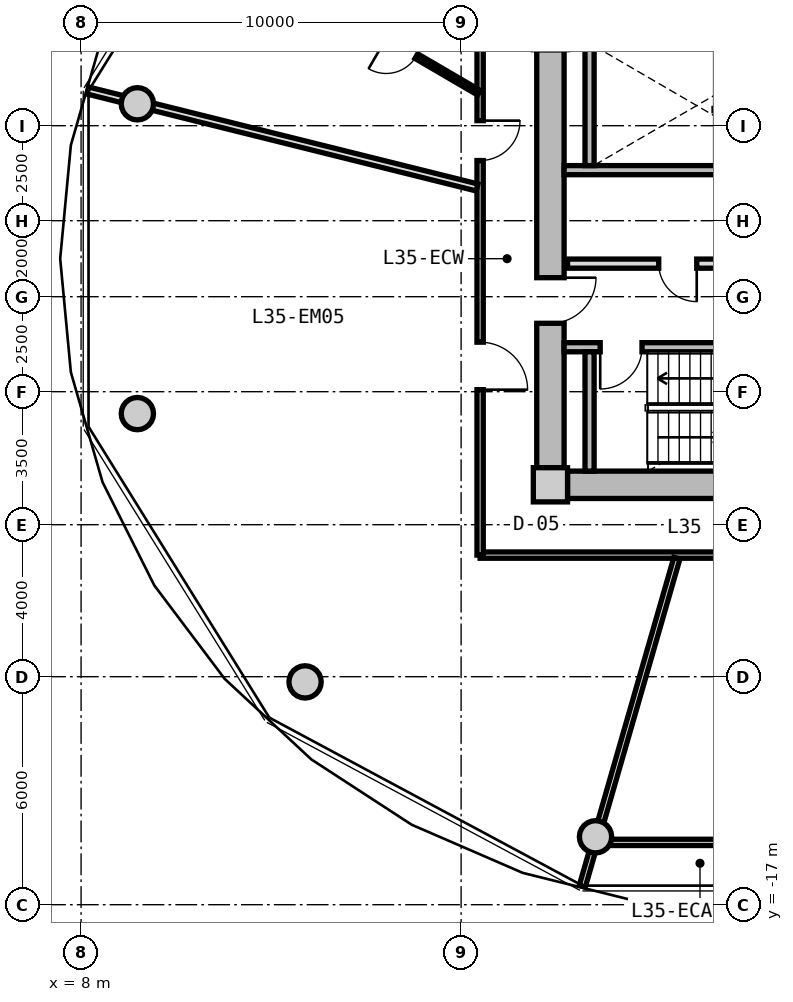
"""IFC4 building model, lengths in metres.
Left out: names, types, materials, properties, quantities, classifications, styles, units other than length and angle.
Written with IfcOpenShell. Run it as: python <this file> out.ifc"""

import sys

from ifc_helpers import new_model, si_unit, direction, frame, frame_2d, origin, origin_2d, place, context, subcontext, project, spatial, rectangle, circle, extrude, source, transform, mapped, element, fill, save


model = new_model("IFC4")
c1 = context("Model", 3, precision=1e-05, world=origin(), true_north=direction((0.0, 1.0)))
c2 = subcontext(c1, "Body", "Model", "MODEL_VIEW")
j1 = project(units=[si_unit("LENGTHUNIT", "METRE"), si_unit("PLANEANGLEUNIT", "RADIAN")], contexts=[c1])
p1 = place(None, origin())
s1 = spatial("IfcSite", under=j1, at=p1, CompositionType="ELEMENT")
p2 = place(p1, origin())
s2 = spatial("IfcBuilding", under=s1, at=p2, CompositionType="ELEMENT")
p3 = place(p2, frame((0.0, 0.0, 114.55)))
s3 = spatial("IfcBuildingStorey", under=s2, at=p3, CompositionType="ELEMENT", Elevation=114.55)
m1 = source(origin(), c2, "Body", "SweptSolid", [
    extrude(rectangle(XDim=0.9, YDim=0.9, at=origin_2d()), origin(), (0.0, 0.0, 1.0), 3.05),
])
p4 = place(p3, frame((20.35, -5.95, 0.0), z_axis=(0.0, 0.0, 1.0), x_axis=(1.0, 0.0, 0.0)))
e1 = element("IfcColumn", 1, at=p4, inside=s3, PredefinedType="COLUMN", context=c2, shape_type="MappedRepresentation", body=[
    mapped(m1, transform((0.0, 0.0, 0.0), x_axis=(1.0, 0.0, 0.0), y_axis=(0.0, 1.0, 0.0), z_axis=(0.0, 0.0, 1.0), scale=1.0)),
])
m2 = source(origin(), c2, "Body", "SweptSolid", [
    extrude(rectangle(XDim=14.4, YDim=0.72, at=frame_2d((7.2, 0.0))), origin(), (0.0, 0.0, 1.0), 2.79),
])
p5 = place(p3, frame((35.2, -5.95, 0.0), z_axis=(0.0, 0.0, 1.0), x_axis=(-1.0, 0.0, 0.0)))
e2 = element("IfcWall", 2, at=p5, inside=s3, PredefinedType="SHEAR", context=c2, shape_type="MappedRepresentation", body=[
    mapped(m2, transform((0.0, 0.0, 0.0), x_axis=(1.0, 0.0, 0.0), y_axis=(0.0, 1.0, 0.0), z_axis=(0.0, 0.0, 1.0), scale=1.0)),
])
m3 = source(origin(), c2, "Body", "SweptSolid", [
    extrude(rectangle(XDim=11.0, YDim=0.72, at=frame_2d((5.5, 0.0))), origin(), (0.0, 0.0, 1.0), 2.79),
])
p6 = place(p3, frame((20.35, -5.5, 0.0), z_axis=(0.0, 0.0, 1.0), x_axis=(0.0, 1.0, 0.0)))
e3 = element("IfcWall", 3, at=p6, inside=s3, PredefinedType="SHEAR", context=c2, shape_type="MappedRepresentation", body=[
    mapped(m3, transform((0.0, 0.0, 0.0), x_axis=(1.0, 0.0, 0.0), y_axis=(0.0, 1.0, 0.0), z_axis=(0.0, 0.0, 1.0), scale=1.0)),
])
p7 = place(p6, frame((3.8, 0.0, 0.0)))
e4 = element("IfcOpeningElement", 4, at=p7, cuts=e3, PredefinedType="OPENING", context=c2, shape_type="SweptSolid", body=[
    extrude(rectangle(XDim=1.2, YDim=2.15, at=frame_2d((0.6, 1.075))), frame((0.0, 0.37, 0.0), z_axis=(0.0, -1.0, 0.0), x_axis=(1.0, 0.0, 0.0)), (0.0, 0.0, 1.0), 0.74),
])
m4 = source(origin(), c2, "Body", "SweptSolid", [
    extrude(circle(Radius=0.425, at=origin_2d()), origin(), (0.0, 0.0, 1.0), 3.05),
])
for number, where, z_axis, x_axis in (
    (5, (9.481, 4.076, 0.0), (0.0, 0.0, 1.0), (1.0, 0.0, 0.0)),
    (6, (9.481, -4.076, 0.0), (0.0, 0.0, 1.0), (1.0, 0.0, 0.0)),
    (7, (13.894, -11.137, 0.0), (0.0, 0.0, 1.0), (1.0, 0.0, 0.0)),
    (8, (21.537, -15.213, 0.0), (0.0, 0.0, 1.0), (1.0, 0.0, 0.0)),
):
    element("IfcColumn", number, at=place(p3, frame(where, z_axis=z_axis, x_axis=x_axis)), inside=s3, PredefinedType="COLUMN", context=c2, shape_type="MappedRepresentation", body=[
        mapped(m4, transform((0.0, 0.0, 0.0), x_axis=(1.0, 0.0, 0.0), y_axis=(0.0, 1.0, 0.0), z_axis=(0.0, 0.0, 1.0), scale=1.0)),
    ])
m5 = source(origin(), c2, "Body", "SweptSolid", [
    extrude(rectangle(XDim=7.83, YDim=0.24, at=frame_2d((3.915, 0.0))), origin(), (0.0, 0.0, 1.0), 2.79),
])
p8 = place(p3, frame((20.71, 2.33, 0.0), z_axis=(0.0, 0.0, 1.0), x_axis=(1.0, 0.0, 0.0)))
e9 = element("IfcWall", 9, at=p8, inside=s3, PredefinedType="PARTITIONING", context=c2, shape_type="MappedRepresentation", body=[
    mapped(m5, transform((0.0, 0.0, 0.0), x_axis=(1.0, 0.0, 0.0), y_axis=(0.0, 1.0, 0.0), z_axis=(0.0, 0.0, 1.0), scale=1.0)),
])
m6 = source(origin(), c2, "Body", "SweptSolid", [
    extrude(rectangle(XDim=3.14, YDim=0.24, at=frame_2d((1.57, 0.0))), origin(), (0.0, 0.0, 1.0), 2.79),
])
p9 = place(p3, frame((21.38, 2.45, 0.0), z_axis=(0.0, 0.0, 1.0), x_axis=(0.0, 1.0, 0.0)))
e10 = element("IfcWall", 10, at=p9, inside=s3, PredefinedType="PARTITIONING", context=c2, shape_type="MappedRepresentation", body=[
    mapped(m6, transform((0.0, 0.0, 0.0), x_axis=(1.0, 0.0, 0.0), y_axis=(0.0, 1.0, 0.0), z_axis=(0.0, 0.0, 1.0), scale=1.0)),
])
p10 = place(p3, frame((20.71, -2.33, 0.0), z_axis=(0.0, 0.0, 1.0), x_axis=(1.0, 0.0, 0.0)))
e11 = element("IfcWall", 11, at=p10, inside=s3, PredefinedType="PARTITIONING", context=c2, shape_type="MappedRepresentation", body=[
    mapped(m5, transform((0.0, 0.0, 0.0), x_axis=(1.0, 0.0, 0.0), y_axis=(0.0, 1.0, 0.0), z_axis=(0.0, 0.0, 1.0), scale=1.0)),
])
p11 = place(p10, frame((0.95, 0.0, 0.0)))
e12 = element("IfcOpeningElement", 12, at=p11, cuts=e11, PredefinedType="OPENING", context=c2, shape_type="SweptSolid", body=[
    extrude(rectangle(XDim=1.1, YDim=2.15, at=frame_2d((0.55, 1.075))), frame((0.0, 0.13, 0.0), z_axis=(0.0, -1.0, 0.0), x_axis=(1.0, 0.0, 0.0)), (0.0, 0.0, 1.0), 0.26),
])
p12 = place(p3, frame((21.38, -5.59, 0.0), z_axis=(0.0, 0.0, 1.0), x_axis=(0.0, 1.0, 0.0)))
e13 = element("IfcWall", 13, at=p12, inside=s3, PredefinedType="PARTITIONING", context=c2, shape_type="MappedRepresentation", body=[
    mapped(m6, transform((0.0, 0.0, 0.0), x_axis=(1.0, 0.0, 0.0), y_axis=(0.0, 1.0, 0.0), z_axis=(0.0, 0.0, 1.0), scale=1.0)),
])
m7 = source(origin(), c2, "Body", "SweptSolid", [
    extrude(rectangle(XDim=7.62, YDim=0.24, at=frame_2d((3.81, 0.0))), origin(), (0.0, 0.0, 1.0), 2.775),
])
p13 = place(p3, frame((20.8, -0.13, 0.0), z_axis=(0.0, 0.0, 1.0), x_axis=(1.0, 0.0, 0.0)))
e14 = element("IfcWall", 14, at=p13, inside=s3, PredefinedType="PARTITIONING", context=c2, shape_type="MappedRepresentation", body=[
    mapped(m7, transform((0.0, 0.0, 0.0), x_axis=(1.0, 0.0, 0.0), y_axis=(0.0, 1.0, 0.0), z_axis=(0.0, 0.0, 1.0), scale=1.0)),
])
p14 = place(p13, frame((6.22, 0.0, 0.0)))
e15 = element("IfcOpeningElement", 15, at=p14, cuts=e14, PredefinedType="OPENING", context=c2, shape_type="SweptSolid", body=[
    extrude(rectangle(XDim=1.0, YDim=2.1, at=frame_2d((0.5, 1.05))), frame((0.0, 0.13, 0.0), z_axis=(0.0, -1.0, 0.0), x_axis=(1.0, 0.0, 0.0)), (0.0, 0.0, 1.0), 0.26),
])
p15 = place(p13, frame((2.4, 0.0, 0.0)))
e16 = element("IfcOpeningElement", 16, at=p15, cuts=e14, PredefinedType="OPENING", context=c2, shape_type="SweptSolid", body=[
    extrude(rectangle(XDim=1.0, YDim=2.1, at=frame_2d((0.5, 1.05))), frame((0.0, 0.13, 0.0), z_axis=(0.0, -1.0, 0.0), x_axis=(1.0, 0.0, 0.0)), (0.0, 0.0, 1.0), 0.26),
])
m8 = source(origin(), c2, "Body", "SweptSolid", [
    extrude(rectangle(XDim=8.6, YDim=0.165, at=frame_2d((4.3, 0.0))), origin(), (0.0, 0.0, 1.0), 2.775),
])
p16 = place(p3, frame((27.1, -7.8, 0.0), z_axis=(0.0, 0.0, 1.0), x_axis=(-1.0, 0.0, 0.0)))
e17 = element("IfcWall", 17, at=p16, inside=s3, PredefinedType="PARTITIONING", context=c2, shape_type="MappedRepresentation", body=[
    mapped(m8, transform((0.0, 0.0, 0.0), x_axis=(1.0, 0.0, 0.0), y_axis=(0.0, 1.0, 0.0), z_axis=(0.0, 0.0, 1.0), scale=1.0)),
])
m9 = source(origin(), c2, "Body", "SweptSolid", [
    extrude(rectangle(XDim=15.6, YDim=0.165, at=frame_2d((7.8, 0.0))), origin(), (0.0, 0.0, 1.0), 2.775),
])
p17 = place(p3, frame((18.5, -7.8, 0.0), z_axis=(0.0, 0.0, 1.0), x_axis=(0.0, 1.0, 0.0)))
e18 = element("IfcWall", 18, at=p17, inside=s3, PredefinedType="PARTITIONING", context=c2, shape_type="MappedRepresentation", body=[
    mapped(m9, transform((0.0, 0.0, 0.0), x_axis=(1.0, 0.0, 0.0), y_axis=(0.0, 1.0, 0.0), z_axis=(0.0, 0.0, 1.0), scale=1.0)),
])
p18 = place(p17, frame((10.383, 0.0, 0.0)))
e19 = element("IfcOpeningElement", 19, at=p18, cuts=e18, PredefinedType="OPENING", context=c2, shape_type="SweptSolid", body=[
    extrude(rectangle(XDim=1.05, YDim=2.15, at=frame_2d((0.525, 1.075))), frame((0.0, 0.093, 0.0), z_axis=(0.0, -1.0, 0.0), x_axis=(1.0, 0.0, 0.0)), (0.0, 0.0, 1.0), 0.185),
])
p19 = place(p17, frame((4.353, 0.0, 0.0)))
e20 = element("IfcOpeningElement", 20, at=p19, cuts=e18, PredefinedType="OPENING", context=c2, shape_type="SweptSolid", body=[
    extrude(rectangle(XDim=1.25, YDim=2.2, at=frame_2d((0.625, 1.1))), frame((0.0, 0.093, 0.0), z_axis=(0.0, -1.0, 0.0), x_axis=(1.0, 0.0, 0.0)), (0.0, 0.0, 1.0), 0.185),
])
m10 = source(origin(), c2, "Body", "SweptSolid", [
    extrude(rectangle(XDim=8.989, YDim=0.165, at=frame_2d((4.495, 0.0))), origin(), (0.0, 0.0, 1.0), 2.275),
])
p20 = place(p3, frame((23.678, -7.88, 0.0), z_axis=(0.0, 0.0, 1.0), x_axis=(-0.27702323008, -0.960863221274, 0.0)))
e21 = element("IfcWall", 21, at=p20, inside=s3, PredefinedType="PARTITIONING", context=c2, shape_type="MappedRepresentation", body=[
    mapped(m10, transform((0.0, 0.0, 0.0), x_axis=(1.0, 0.0, 0.0), y_axis=(0.0, 1.0, 0.0), z_axis=(0.0, 0.0, 1.0), scale=1.0)),
])
m11 = source(origin(), c2, "Body", "SweptSolid", [
    extrude(rectangle(XDim=5.814, YDim=0.165, at=frame_2d((2.907, 0.0))), origin(), (0.0, 0.0, 1.0), 2.275),
])
p21 = place(p3, frame((21.366, -15.36, 0.0), z_axis=(0.0, 0.0, 1.0), x_axis=(1.0, 0.0, 0.0)))
e22 = element("IfcWall", 22, at=p21, inside=s3, PredefinedType="PARTITIONING", context=c2, shape_type="MappedRepresentation", body=[
    mapped(m11, transform((0.0, 0.0, 0.0), x_axis=(1.0, 0.0, 0.0), y_axis=(0.0, 1.0, 0.0), z_axis=(0.0, 0.0, 1.0), scale=1.0)),
])
m12 = source(origin(), c2, "Body", "SweptSolid", [
    extrude(rectangle(XDim=10.556, YDim=0.19, at=frame_2d((5.278, 0.0))), origin(), (0.0, 0.0, 1.0), 2.275),
])
p22 = place(p3, frame((18.42, 1.875, 0.0), z_axis=(0.0, 0.0, 1.0), x_axis=(-0.970363857851, 0.241648470667, 0.0)))
e23 = element("IfcWall", 23, at=p22, inside=s3, PredefinedType="PARTITIONING", context=c2, shape_type="MappedRepresentation", body=[
    mapped(m12, transform((0.0, 0.0, 0.0), x_axis=(1.0, 0.0, 0.0), y_axis=(0.0, 1.0, 0.0), z_axis=(0.0, 0.0, 1.0), scale=1.0)),
])
m13 = source(origin(), c2, "Body", "SweptSolid", [
    extrude(rectangle(XDim=4.735, YDim=0.14, at=frame_2d((2.368, 0.0))), origin(), (0.0, 0.0, 1.0), 2.775),
])
p23 = place(p3, frame((18.47, 4.368, 0.0), z_axis=(0.0, 0.0, 1.0), x_axis=(-0.863537576642, 0.504284496814, 0.0)))
e24 = element("IfcWall", 24, at=p23, inside=s3, PredefinedType="PARTITIONING", context=c2, shape_type="MappedRepresentation", body=[
    mapped(m13, transform((0.0, 0.0, 0.0), x_axis=(1.0, 0.0, 0.0), y_axis=(0.0, 1.0, 0.0), z_axis=(0.0, 0.0, 1.0), scale=1.0)),
])
p24 = place(p23, frame((1.908, 0.0, 0.0)))
e25 = element("IfcOpeningElement", 25, at=p24, cuts=e24, PredefinedType="OPENING", context=c2, shape_type="SweptSolid", body=[
    extrude(rectangle(XDim=0.92, YDim=2.1, at=frame_2d((0.46, 1.05))), frame((0.0, 0.08, 0.0), z_axis=(0.0, -1.0, 0.0), x_axis=(1.0, 0.0, 0.0)), (0.0, 0.0, 1.0), 0.16),
])
m14 = source(origin(), c2, "Body", "SweptSolid", [
    extrude(rectangle(XDim=1.1, YDim=2.15, at=frame_2d((0.55, 1.075))), frame((0.0, 0.025, 0.0), z_axis=(0.0, -1.0, 0.0), x_axis=(1.0, 0.0, 0.0)), (0.0, 0.0, 1.0), 0.05),
])
p25 = place(p11, frame((1.1, 0.0, 0.0), z_axis=(0.0, 0.0, 1.0), x_axis=(-1.0, 0.0, 0.0)))
e26 = element("IfcDoor", 26, at=p25, inside=s3, OperationType="SINGLE_SWING_RIGHT", PredefinedType="DOOR", context=c2, shape_type="MappedRepresentation", body=[
    mapped(m14, transform((0.0, 0.0, 0.0), x_axis=(1.0, 0.0, 0.0), y_axis=(0.0, 1.0, 0.0), z_axis=(0.0, 0.0, 1.0), scale=1.0)),
])
fill(e12, e26)
m15 = source(origin(), c2, "Body", "SweptSolid", [
    extrude(rectangle(XDim=1.2, YDim=2.15, at=frame_2d((0.6, 1.075))), frame((0.0, 0.025, 0.0), z_axis=(0.0, -1.0, 0.0), x_axis=(1.0, 0.0, 0.0)), (0.0, 0.0, 1.0), 0.05),
])
p26 = place(p7, frame((1.2, 0.0, 0.0), z_axis=(0.0, 0.0, 1.0), x_axis=(-1.0, 0.0, 0.0)))
e27 = element("IfcDoor", 27, at=p26, inside=s3, OperationType="SINGLE_SWING_LEFT", PredefinedType="DOOR", context=c2, shape_type="MappedRepresentation", body=[
    mapped(m15, transform((0.0, 0.0, 0.0), x_axis=(1.0, 0.0, 0.0), y_axis=(0.0, 1.0, 0.0), z_axis=(0.0, 0.0, 1.0), scale=1.0)),
])
fill(e4, e27)
m16 = source(origin(), c2, "Body", "SweptSolid", [
    extrude(rectangle(XDim=1.0, YDim=2.1, at=frame_2d((0.5, 1.05))), frame((0.0, 0.025, 0.0), z_axis=(0.0, -1.0, 0.0), x_axis=(1.0, 0.0, 0.0)), (0.0, 0.0, 1.0), 0.05),
])
p27 = place(p15, frame((1.0, 0.0, 0.0), z_axis=(0.0, 0.0, 1.0), x_axis=(-1.0, 0.0, 0.0)))
e28 = element("IfcDoor", 28, at=p27, inside=s3, OperationType="SINGLE_SWING_LEFT", PredefinedType="DOOR", context=c2, shape_type="MappedRepresentation", body=[
    mapped(m16, transform((0.0, 0.0, 0.0), x_axis=(1.0, 0.0, 0.0), y_axis=(0.0, 1.0, 0.0), z_axis=(0.0, 0.0, 1.0), scale=1.0)),
])
fill(e16, e28)
m17 = source(origin(), c2, "Body", "SweptSolid", [
    extrude(rectangle(XDim=1.05, YDim=2.15, at=frame_2d((0.525, 1.075))), frame((0.0, 0.025, 0.0), z_axis=(0.0, -1.0, 0.0), x_axis=(1.0, 0.0, 0.0)), (0.0, 0.0, 1.0), 0.05),
])
p28 = place(p18, frame((1.05, 0.0, 0.0), z_axis=(0.0, 0.0, 1.0), x_axis=(-1.0, 0.0, 0.0)))
e29 = element("IfcDoor", 29, at=p28, inside=s3, OperationType="SINGLE_SWING_LEFT", PredefinedType="DOOR", context=c2, shape_type="MappedRepresentation", body=[
    mapped(m17, transform((0.0, 0.0, 0.0), x_axis=(1.0, 0.0, 0.0), y_axis=(0.0, 1.0, 0.0), z_axis=(0.0, 0.0, 1.0), scale=1.0)),
])
fill(e19, e29)
m18 = source(origin(), c2, "Body", "SweptSolid", [
    extrude(rectangle(XDim=0.92, YDim=2.1, at=frame_2d((0.46, 1.05))), frame((0.0, 0.025, 0.0), z_axis=(0.0, -1.0, 0.0), x_axis=(1.0, 0.0, 0.0)), (0.0, 0.0, 1.0), 0.05),
])
p29 = place(p24, origin())
e30 = element("IfcDoor", 30, at=p29, inside=s3, OperationType="SINGLE_SWING_RIGHT", PredefinedType="DOOR", context=c2, shape_type="MappedRepresentation", body=[
    mapped(m18, transform((0.0, 0.0, 0.0), x_axis=(1.0, 0.0, 0.0), y_axis=(0.0, 1.0, 0.0), z_axis=(0.0, 0.0, 1.0), scale=1.0)),
])
fill(e25, e30)
m19 = source(origin(), c2, "Body", "SweptSolid", [
    extrude(rectangle(XDim=1.25, YDim=2.2, at=frame_2d((0.625, 1.1))), frame((0.0, 0.025, 0.0), z_axis=(0.0, -1.0, 0.0), x_axis=(1.0, 0.0, 0.0)), (0.0, 0.0, 1.0), 0.05),
])
p30 = place(p19, frame((1.25, 0.0, 0.0), z_axis=(0.0, 0.0, 1.0), x_axis=(-1.0, 0.0, 0.0)))
e31 = element("IfcDoor", 31, at=p30, inside=s3, OperationType="SINGLE_SWING_RIGHT", PredefinedType="DOOR", context=c2, shape_type="MappedRepresentation", body=[
    mapped(m19, transform((0.0, 0.0, 0.0), x_axis=(1.0, 0.0, 0.0), y_axis=(0.0, 1.0, 0.0), z_axis=(0.0, 0.0, 1.0), scale=1.0)),
])
fill(e20, e31)
save(model, sys.argv[1])
